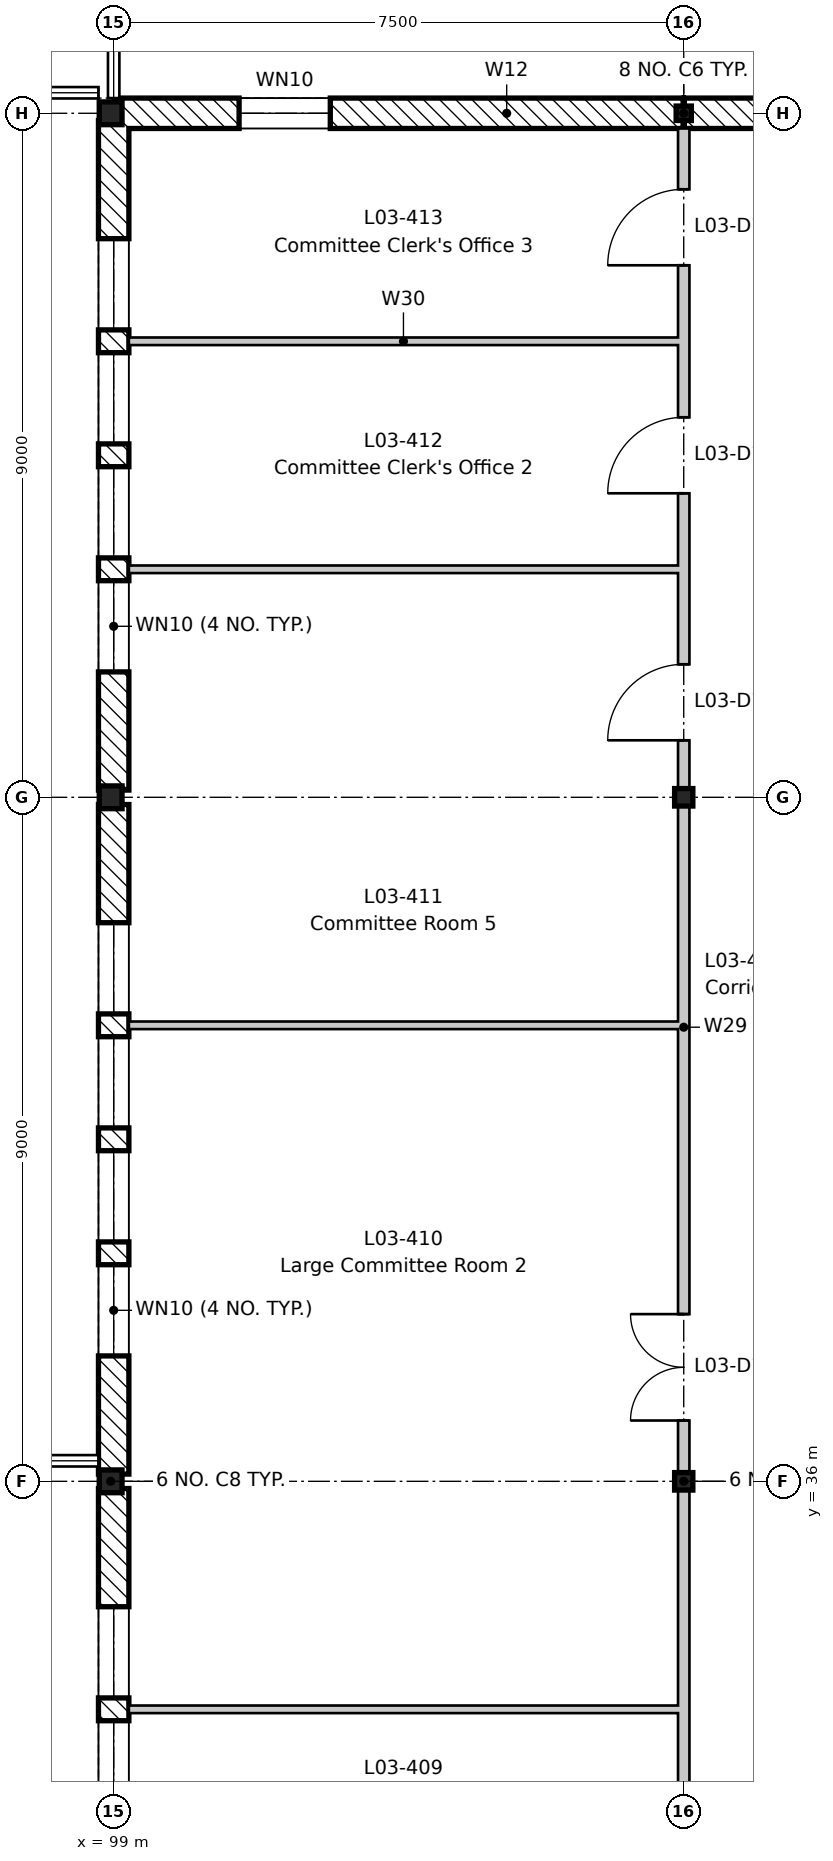
"""IFC4 building model, lengths in metres.
Left out: names, types, materials, properties, quantities, classifications, styles, units other than length and angle.
Written with IfcOpenShell. Run it as: python <this file> out.ifc"""

import sys

from ifc_helpers import new_model, si_unit, direction, frame, frame_2d, origin, origin_2d, place, context, subcontext, project, spatial, rectangle, i_section, extrude, element, fill, save


model = new_model("IFC4")
c1 = context("Model", 3, precision=1e-05, world=origin(), true_north=direction((0.0, 1.0)))
c2 = subcontext(c1, "Body", "Model", "MODEL_VIEW")
j1 = project(units=[si_unit("LENGTHUNIT", "METRE"), si_unit("PLANEANGLEUNIT", "RADIAN")], contexts=[c1])
p1 = place(None, origin())
s1 = spatial("IfcSite", under=j1, at=p1, CompositionType="ELEMENT")
p2 = place(p1, origin())
s2 = spatial("IfcBuilding", under=s1, at=p2, CompositionType="ELEMENT")
p3 = place(p2, frame((0.0, 0.0, 14.4)))
s3 = spatial("IfcBuildingStorey", under=s2, at=p3, CompositionType="ELEMENT", Elevation=14.4)
for number, where, z_axis, x_axis in (
    (1, (99.0, 36.0, -0.2), (0.0, 0.0, 1.0), (1.0, 0.0, 0.0)),
    (2, (99.0, 45.0, -0.2), (0.0, 0.0, 1.0), (1.0, 0.0, 0.0)),
    (3, (99.0, 54.0, -0.2), (0.0, 0.0, 1.0), (1.0, 0.0, 0.0)),
):
    element("IfcColumn", number, at=place(p3, frame(where, z_axis=z_axis, x_axis=x_axis)), inside=s3, PredefinedType="COLUMN", context=c2, shape_type="SweptSolid", body=[
        extrude(i_section(OverallWidth=0.2, OverallDepth=0.19, WebThickness=0.007, FlangeThickness=0.01, FilletRadius=0.018, at=origin_2d()), origin(), (0.0, 0.0, 1.0), 4.15),
    ])
for number, where, z_axis, x_axis in (
    (4, (106.5, 36.0, -0.2), (0.0, 0.0, 1.0), (1.0, 0.0, 0.0)),
    (5, (106.5, 45.0, -0.2), (0.0, 0.0, 1.0), (1.0, 0.0, 0.0)),
):
    element("IfcColumn", number, at=place(p3, frame(where, z_axis=z_axis, x_axis=x_axis)), inside=s3, PredefinedType="COLUMN", context=c2, shape_type="SweptSolid", body=[
        extrude(i_section(OverallWidth=0.24, OverallDepth=0.23, WebThickness=0.008, FlangeThickness=0.012, FilletRadius=0.021, at=origin_2d()), origin(), (0.0, 0.0, 1.0), 4.15),
    ])
p4 = place(p3, frame((106.5, 54.0, -0.2), z_axis=(0.0, 0.0, 1.0), x_axis=(1.0, 0.0, 0.0)))
e6 = element("IfcColumn", 6, at=p4, inside=s3, PredefinedType="COLUMN", context=c2, shape_type="SweptSolid", body=[
    extrude(i_section(OverallWidth=0.2, OverallDepth=0.19, WebThickness=0.007, FlangeThickness=0.01, FilletRadius=0.018, at=origin_2d()), origin(), (0.0, 0.0, 1.0), 4.15),
])
for number, where, z_axis, x_axis in (
    (7, (98.96, 36.0, 3.95), (0.0, 0.0, 1.0), (1.0, 0.0, 0.0)),
    (8, (98.96, 45.0, 3.95), (0.0, 0.0, 1.0), (1.0, 0.0, 0.0)),
    (9, (98.96, 54.0, 3.95), (0.0, 0.0, 1.0), (1.0, 0.0, 0.0)),
):
    element("IfcColumn", number, at=place(p3, frame(where, z_axis=z_axis, x_axis=x_axis)), inside=s3, PredefinedType="COLUMN", context=c2, shape_type="SweptSolid", body=[
        extrude(i_section(OverallWidth=0.3, OverallDepth=0.3, WebThickness=0.011, FlangeThickness=0.019, FilletRadius=0.027, at=origin_2d()), origin(), (0.0, 0.0, 1.0), 0.25),
    ])
p5 = place(p3, frame((99.0, 27.095, 0.0), z_axis=(0.0, 0.0, 1.0), x_axis=(0.0, 1.0, 0.0)))
e10 = element("IfcWall", 10, at=p5, inside=s3, PredefinedType="STANDARD", context=c2, shape_type="SweptSolid", body=[
    extrude(rectangle(XDim=8.81, YDim=0.4, at=frame_2d((4.405, 0.0))), origin(), (0.0, 0.0, 1.0), 3.55),
])
p6 = place(p5, frame((1.555, 0.0, 0.6)))
e11 = element("IfcOpeningElement", 11, at=p6, cuts=e10, PredefinedType="OPENING", context=c2, shape_type="SweptSolid", body=[
    extrude(rectangle(XDim=1.2, YDim=1.8, at=frame_2d((0.6, 0.9))), frame((0.0, 0.21, 0.0), z_axis=(0.0, -1.0, 0.0), x_axis=(1.0, 0.0, 0.0)), (0.0, 0.0, 1.0), 0.42),
])
p7 = place(p5, frame((3.055, 0.0, 0.6)))
e12 = element("IfcOpeningElement", 12, at=p7, cuts=e10, PredefinedType="OPENING", context=c2, shape_type="SweptSolid", body=[
    extrude(rectangle(XDim=1.2, YDim=1.8, at=frame_2d((0.6, 0.9))), frame((0.0, 0.21, 0.0), z_axis=(0.0, -1.0, 0.0), x_axis=(1.0, 0.0, 0.0)), (0.0, 0.0, 1.0), 0.42),
])
p8 = place(p5, frame((4.555, 0.0, 0.6)))
e13 = element("IfcOpeningElement", 13, at=p8, cuts=e10, PredefinedType="OPENING", context=c2, shape_type="SweptSolid", body=[
    extrude(rectangle(XDim=1.2, YDim=1.8, at=frame_2d((0.6, 0.9))), frame((0.0, 0.21, 0.0), z_axis=(0.0, -1.0, 0.0), x_axis=(1.0, 0.0, 0.0)), (0.0, 0.0, 1.0), 0.42),
])
p9 = place(p5, frame((6.055, 0.0, 0.6)))
e14 = element("IfcOpeningElement", 14, at=p9, cuts=e10, PredefinedType="OPENING", context=c2, shape_type="SweptSolid", body=[
    extrude(rectangle(XDim=1.2, YDim=1.8, at=frame_2d((0.6, 0.9))), frame((0.0, 0.21, 0.0), z_axis=(0.0, -1.0, 0.0), x_axis=(1.0, 0.0, 0.0)), (0.0, 0.0, 1.0), 0.42),
])
p10 = place(p3, frame((99.0, 36.095, 0.0), z_axis=(0.0, 0.0, 1.0), x_axis=(0.0, 1.0, 0.0)))
e15 = element("IfcWall", 15, at=p10, inside=s3, PredefinedType="STANDARD", context=c2, shape_type="SweptSolid", body=[
    extrude(rectangle(XDim=8.81, YDim=0.4, at=frame_2d((4.405, 0.0))), origin(), (0.0, 0.0, 1.0), 3.55),
])
p11 = place(p10, frame((1.555, 0.0, 0.6)))
e16 = element("IfcOpeningElement", 16, at=p11, cuts=e15, PredefinedType="OPENING", context=c2, shape_type="SweptSolid", body=[
    extrude(rectangle(XDim=1.2, YDim=1.8, at=frame_2d((0.6, 0.9))), frame((0.0, 0.21, 0.0), z_axis=(0.0, -1.0, 0.0), x_axis=(1.0, 0.0, 0.0)), (0.0, 0.0, 1.0), 0.42),
])
p12 = place(p10, frame((3.055, 0.0, 0.6)))
e17 = element("IfcOpeningElement", 17, at=p12, cuts=e15, PredefinedType="OPENING", context=c2, shape_type="SweptSolid", body=[
    extrude(rectangle(XDim=1.2, YDim=1.8, at=frame_2d((0.6, 0.9))), frame((0.0, 0.21, 0.0), z_axis=(0.0, -1.0, 0.0), x_axis=(1.0, 0.0, 0.0)), (0.0, 0.0, 1.0), 0.42),
])
p13 = place(p10, frame((4.555, 0.0, 0.6)))
e18 = element("IfcOpeningElement", 18, at=p13, cuts=e15, PredefinedType="OPENING", context=c2, shape_type="SweptSolid", body=[
    extrude(rectangle(XDim=1.2, YDim=1.8, at=frame_2d((0.6, 0.9))), frame((0.0, 0.21, 0.0), z_axis=(0.0, -1.0, 0.0), x_axis=(1.0, 0.0, 0.0)), (0.0, 0.0, 1.0), 0.42),
])
p14 = place(p10, frame((6.055, 0.0, 0.6)))
e19 = element("IfcOpeningElement", 19, at=p14, cuts=e15, PredefinedType="OPENING", context=c2, shape_type="SweptSolid", body=[
    extrude(rectangle(XDim=1.2, YDim=1.8, at=frame_2d((0.6, 0.9))), frame((0.0, 0.21, 0.0), z_axis=(0.0, -1.0, 0.0), x_axis=(1.0, 0.0, 0.0)), (0.0, 0.0, 1.0), 0.42),
])
p15 = place(p3, frame((99.0, 45.095, 0.0), z_axis=(0.0, 0.0, 1.0), x_axis=(0.0, 1.0, 0.0)))
e20 = element("IfcWall", 20, at=p15, inside=s3, PredefinedType="STANDARD", context=c2, shape_type="SweptSolid", body=[
    extrude(rectangle(XDim=8.81, YDim=0.4, at=frame_2d((4.405, 0.0))), origin(), (0.0, 0.0, 1.0), 3.55),
])
p16 = place(p15, frame((1.555, 0.0, 0.6)))
e21 = element("IfcOpeningElement", 21, at=p16, cuts=e20, PredefinedType="OPENING", context=c2, shape_type="SweptSolid", body=[
    extrude(rectangle(XDim=1.2, YDim=1.8, at=frame_2d((0.6, 0.9))), frame((0.0, 0.21, 0.0), z_axis=(0.0, -1.0, 0.0), x_axis=(1.0, 0.0, 0.0)), (0.0, 0.0, 1.0), 0.42),
])
p17 = place(p15, frame((3.055, 0.0, 0.6)))
e22 = element("IfcOpeningElement", 22, at=p17, cuts=e20, PredefinedType="OPENING", context=c2, shape_type="SweptSolid", body=[
    extrude(rectangle(XDim=1.2, YDim=1.8, at=frame_2d((0.6, 0.9))), frame((0.0, 0.21, 0.0), z_axis=(0.0, -1.0, 0.0), x_axis=(1.0, 0.0, 0.0)), (0.0, 0.0, 1.0), 0.42),
])
p18 = place(p15, frame((4.555, 0.0, 0.6)))
e23 = element("IfcOpeningElement", 23, at=p18, cuts=e20, PredefinedType="OPENING", context=c2, shape_type="SweptSolid", body=[
    extrude(rectangle(XDim=1.2, YDim=1.8, at=frame_2d((0.6, 0.9))), frame((0.0, 0.21, 0.0), z_axis=(0.0, -1.0, 0.0), x_axis=(1.0, 0.0, 0.0)), (0.0, 0.0, 1.0), 0.42),
])
p19 = place(p15, frame((6.055, 0.0, 0.6)))
e24 = element("IfcOpeningElement", 24, at=p19, cuts=e20, PredefinedType="OPENING", context=c2, shape_type="SweptSolid", body=[
    extrude(rectangle(XDim=1.2, YDim=1.8, at=frame_2d((0.6, 0.9))), frame((0.0, 0.21, 0.0), z_axis=(0.0, -1.0, 0.0), x_axis=(1.0, 0.0, 0.0)), (0.0, 0.0, 1.0), 0.42),
])
p20 = place(p3, frame((99.008, 54.0, 0.0), z_axis=(0.0, 0.0, 1.0), x_axis=(1.0, 0.0, 0.0)))
e25 = element("IfcWall", 25, at=p20, inside=s3, PredefinedType="STANDARD", context=c2, shape_type="SweptSolid", body=[
    extrude(rectangle(XDim=7.483, YDim=0.4, at=frame_2d((3.742, 0.0))), origin(), (0.0, 0.0, 1.0), 3.62),
])
p21 = place(p20, frame((1.642, 0.0, 0.6)))
e26 = element("IfcOpeningElement", 26, at=p21, cuts=e25, PredefinedType="OPENING", context=c2, shape_type="SweptSolid", body=[
    extrude(rectangle(XDim=1.2, YDim=1.8, at=frame_2d((0.6, 0.9))), frame((0.0, 0.21, 0.0), z_axis=(0.0, -1.0, 0.0), x_axis=(1.0, 0.0, 0.0)), (0.0, 0.0, 1.0), 0.42),
])
p22 = place(p3, frame((106.508, 54.0, 0.0), z_axis=(0.0, 0.0, 1.0), x_axis=(1.0, 0.0, 0.0)))
e27 = element("IfcWall", 27, at=p22, inside=s3, PredefinedType="STANDARD", context=c2, shape_type="SweptSolid", body=[
    extrude(rectangle(XDim=2.983, YDim=0.4, at=frame_2d((1.492, 0.0))), origin(), (0.0, 0.0, 1.0), 3.75),
])
for number, where, z_axis, x_axis in (
    (28, (99.2, 33.0, 0.0), (0.0, 0.0, 1.0), (1.0, 0.0, 0.0)),
    (29, (99.2, 42.0, 0.0), (0.0, 0.0, 1.0), (1.0, 0.0, 0.0)),
    (30, (99.2, 48.0, 0.0), (0.0, 0.0, 1.0), (1.0, 0.0, 0.0)),
    (31, (99.2, 51.0, 0.0), (0.0, 0.0, 1.0), (1.0, 0.0, 0.0)),
):
    element("IfcWall", number, at=place(p3, frame(where, z_axis=z_axis, x_axis=x_axis)), inside=s3, PredefinedType="PARTITIONING", context=c2, shape_type="SweptSolid", body=[
        extrude(rectangle(XDim=7.225, YDim=0.1, at=frame_2d((3.613, 0.0))), origin(), (0.0, 0.0, 1.0), 3.95),
    ])
p23 = place(p3, frame((106.5, 0.2, 0.0), z_axis=(0.0, 0.0, 1.0), x_axis=(0.0, 1.0, 0.0)))
e32 = element("IfcWall", 32, at=p23, inside=s3, PredefinedType="PARTITIONING", context=c2, shape_type="SweptSolid", body=[
    extrude(rectangle(XDim=53.6, YDim=0.15, at=frame_2d((26.8, 0.0))), origin(), (0.0, 0.0, 1.0), 3.43),
])
p24 = place(p23, frame((3.6, 0.0, 0.0)))
e33 = element("IfcOpeningElement", 33, at=p24, cuts=e32, PredefinedType="OPENING", context=c2, shape_type="SweptSolid", body=[
    extrude(rectangle(XDim=1.4, YDim=2.1, at=frame_2d((0.7, 1.05))), frame((0.0, 0.085, 0.0), z_axis=(0.0, -1.0, 0.0), x_axis=(1.0, 0.0, 0.0)), (0.0, 0.0, 1.0), 0.17),
])
p25 = place(p23, frame((11.3, 0.0, 0.0)))
e34 = element("IfcOpeningElement", 34, at=p25, cuts=e32, PredefinedType="OPENING", context=c2, shape_type="SweptSolid", body=[
    extrude(rectangle(XDim=1.0, YDim=2.1, at=frame_2d((0.5, 1.05))), frame((0.0, 0.085, 0.0), z_axis=(0.0, -1.0, 0.0), x_axis=(1.0, 0.0, 0.0)), (0.0, 0.0, 1.0), 0.17),
])
p26 = place(p23, frame((15.8, 0.0, 0.0)))
e35 = element("IfcOpeningElement", 35, at=p26, cuts=e32, PredefinedType="OPENING", context=c2, shape_type="SweptSolid", body=[
    extrude(rectangle(XDim=1.0, YDim=2.1, at=frame_2d((0.5, 1.05))), frame((0.0, 0.085, 0.0), z_axis=(0.0, -1.0, 0.0), x_axis=(1.0, 0.0, 0.0)), (0.0, 0.0, 1.0), 0.17),
])
p27 = place(p23, frame((21.6, 0.0, 0.0)))
e36 = element("IfcOpeningElement", 36, at=p27, cuts=e32, PredefinedType="OPENING", context=c2, shape_type="SweptSolid", body=[
    extrude(rectangle(XDim=1.4, YDim=2.1, at=frame_2d((0.7, 1.05))), frame((0.0, 0.085, 0.0), z_axis=(0.0, -1.0, 0.0), x_axis=(1.0, 0.0, 0.0)), (0.0, 0.0, 1.0), 0.17),
])
p28 = place(p23, frame((29.3, 0.0, 0.0)))
e37 = element("IfcOpeningElement", 37, at=p28, cuts=e32, PredefinedType="OPENING", context=c2, shape_type="SweptSolid", body=[
    extrude(rectangle(XDim=1.0, YDim=2.1, at=frame_2d((0.5, 1.05))), frame((0.0, 0.085, 0.0), z_axis=(0.0, -1.0, 0.0), x_axis=(1.0, 0.0, 0.0)), (0.0, 0.0, 1.0), 0.17),
])
p29 = place(p23, frame((36.6, 0.0, 0.0)))
e38 = element("IfcOpeningElement", 38, at=p29, cuts=e32, PredefinedType="OPENING", context=c2, shape_type="SweptSolid", body=[
    extrude(rectangle(XDim=1.4, YDim=2.1, at=frame_2d((0.7, 1.05))), frame((0.0, 0.085, 0.0), z_axis=(0.0, -1.0, 0.0), x_axis=(1.0, 0.0, 0.0)), (0.0, 0.0, 1.0), 0.17),
])
p30 = place(p23, frame((45.55, 0.0, 0.0)))
e39 = element("IfcOpeningElement", 39, at=p30, cuts=e32, PredefinedType="OPENING", context=c2, shape_type="SweptSolid", body=[
    extrude(rectangle(XDim=1.0, YDim=2.1, at=frame_2d((0.5, 1.05))), frame((0.0, 0.085, 0.0), z_axis=(0.0, -1.0, 0.0), x_axis=(1.0, 0.0, 0.0)), (0.0, 0.0, 1.0), 0.17),
])
p31 = place(p23, frame((48.8, 0.0, 0.0)))
e40 = element("IfcOpeningElement", 40, at=p31, cuts=e32, PredefinedType="OPENING", context=c2, shape_type="SweptSolid", body=[
    extrude(rectangle(XDim=1.0, YDim=2.1, at=frame_2d((0.5, 1.05))), frame((0.0, 0.085, 0.0), z_axis=(0.0, -1.0, 0.0), x_axis=(1.0, 0.0, 0.0)), (0.0, 0.0, 1.0), 0.17),
])
p32 = place(p23, frame((51.8, 0.0, 0.0)))
e41 = element("IfcOpeningElement", 41, at=p32, cuts=e32, PredefinedType="OPENING", context=c2, shape_type="SweptSolid", body=[
    extrude(rectangle(XDim=1.0, YDim=2.1, at=frame_2d((0.5, 1.05))), frame((0.0, 0.085, 0.0), z_axis=(0.0, -1.0, 0.0), x_axis=(1.0, 0.0, 0.0)), (0.0, 0.0, 1.0), 0.17),
])
p33 = place(p8, origin())
e42 = element("IfcWindow", 42, at=p33, inside=s3, PartitioningType="SINGLE_PANEL", PredefinedType="WINDOW", context=c2, shape_type="SweptSolid", body=[
    extrude(rectangle(XDim=1.2, YDim=1.8, at=frame_2d((0.6, 0.9))), frame((0.0, 0.03, 0.0), z_axis=(0.0, -1.0, 0.0), x_axis=(1.0, 0.0, 0.0)), (0.0, 0.0, 1.0), 0.06),
])
fill(e13, e42)
p34 = place(p9, origin())
e43 = element("IfcWindow", 43, at=p34, inside=s3, PartitioningType="SINGLE_PANEL", PredefinedType="WINDOW", context=c2, shape_type="SweptSolid", body=[
    extrude(rectangle(XDim=1.2, YDim=1.8, at=frame_2d((0.6, 0.9))), frame((0.0, 0.03, 0.0), z_axis=(0.0, -1.0, 0.0), x_axis=(1.0, 0.0, 0.0)), (0.0, 0.0, 1.0), 0.06),
])
fill(e14, e43)
p35 = place(p11, origin())
e44 = element("IfcWindow", 44, at=p35, inside=s3, PartitioningType="SINGLE_PANEL", PredefinedType="WINDOW", context=c2, shape_type="SweptSolid", body=[
    extrude(rectangle(XDim=1.2, YDim=1.8, at=frame_2d((0.6, 0.9))), frame((0.0, 0.03, 0.0), z_axis=(0.0, -1.0, 0.0), x_axis=(1.0, 0.0, 0.0)), (0.0, 0.0, 1.0), 0.06),
])
fill(e16, e44)
p36 = place(p12, origin())
e45 = element("IfcWindow", 45, at=p36, inside=s3, PartitioningType="SINGLE_PANEL", PredefinedType="WINDOW", context=c2, shape_type="SweptSolid", body=[
    extrude(rectangle(XDim=1.2, YDim=1.8, at=frame_2d((0.6, 0.9))), frame((0.0, 0.03, 0.0), z_axis=(0.0, -1.0, 0.0), x_axis=(1.0, 0.0, 0.0)), (0.0, 0.0, 1.0), 0.06),
])
fill(e17, e45)
p37 = place(p13, origin())
e46 = element("IfcWindow", 46, at=p37, inside=s3, PartitioningType="SINGLE_PANEL", PredefinedType="WINDOW", context=c2, shape_type="SweptSolid", body=[
    extrude(rectangle(XDim=1.2, YDim=1.8, at=frame_2d((0.6, 0.9))), frame((0.0, 0.03, 0.0), z_axis=(0.0, -1.0, 0.0), x_axis=(1.0, 0.0, 0.0)), (0.0, 0.0, 1.0), 0.06),
])
fill(e18, e46)
p38 = place(p14, origin())
e47 = element("IfcWindow", 47, at=p38, inside=s3, PartitioningType="SINGLE_PANEL", PredefinedType="WINDOW", context=c2, shape_type="SweptSolid", body=[
    extrude(rectangle(XDim=1.2, YDim=1.8, at=frame_2d((0.6, 0.9))), frame((0.0, 0.03, 0.0), z_axis=(0.0, -1.0, 0.0), x_axis=(1.0, 0.0, 0.0)), (0.0, 0.0, 1.0), 0.06),
])
fill(e19, e47)
p39 = place(p16, origin())
e48 = element("IfcWindow", 48, at=p39, inside=s3, PartitioningType="SINGLE_PANEL", PredefinedType="WINDOW", context=c2, shape_type="SweptSolid", body=[
    extrude(rectangle(XDim=1.2, YDim=1.8, at=frame_2d((0.6, 0.9))), frame((0.0, 0.03, 0.0), z_axis=(0.0, -1.0, 0.0), x_axis=(1.0, 0.0, 0.0)), (0.0, 0.0, 1.0), 0.06),
])
fill(e21, e48)
p40 = place(p17, origin())
e49 = element("IfcWindow", 49, at=p40, inside=s3, PartitioningType="SINGLE_PANEL", PredefinedType="WINDOW", context=c2, shape_type="SweptSolid", body=[
    extrude(rectangle(XDim=1.2, YDim=1.8, at=frame_2d((0.6, 0.9))), frame((0.0, 0.03, 0.0), z_axis=(0.0, -1.0, 0.0), x_axis=(1.0, 0.0, 0.0)), (0.0, 0.0, 1.0), 0.06),
])
fill(e22, e49)
p41 = place(p18, origin())
e50 = element("IfcWindow", 50, at=p41, inside=s3, PartitioningType="SINGLE_PANEL", PredefinedType="WINDOW", context=c2, shape_type="SweptSolid", body=[
    extrude(rectangle(XDim=1.2, YDim=1.8, at=frame_2d((0.6, 0.9))), frame((0.0, 0.03, 0.0), z_axis=(0.0, -1.0, 0.0), x_axis=(1.0, 0.0, 0.0)), (0.0, 0.0, 1.0), 0.06),
])
fill(e23, e50)
p42 = place(p19, origin())
e51 = element("IfcWindow", 51, at=p42, inside=s3, PartitioningType="SINGLE_PANEL", PredefinedType="WINDOW", context=c2, shape_type="SweptSolid", body=[
    extrude(rectangle(XDim=1.2, YDim=1.8, at=frame_2d((0.6, 0.9))), frame((0.0, 0.03, 0.0), z_axis=(0.0, -1.0, 0.0), x_axis=(1.0, 0.0, 0.0)), (0.0, 0.0, 1.0), 0.06),
])
fill(e24, e51)
p43 = place(p21, origin())
e52 = element("IfcWindow", 52, at=p43, inside=s3, PartitioningType="SINGLE_PANEL", PredefinedType="WINDOW", context=c2, shape_type="SweptSolid", body=[
    extrude(rectangle(XDim=1.2, YDim=1.8, at=frame_2d((0.6, 0.9))), frame((0.0, 0.03, 0.0), z_axis=(0.0, -1.0, 0.0), x_axis=(1.0, 0.0, 0.0)), (0.0, 0.0, 1.0), 0.06),
])
fill(e26, e52)
p44 = place(p29, origin())
e53 = element("IfcDoor", 53, at=p44, inside=s3, OperationType="DOUBLE_DOOR_SINGLE_SWING", PredefinedType="DOOR", context=c2, shape_type="SweptSolid", body=[
    extrude(rectangle(XDim=1.4, YDim=2.1, at=frame_2d((0.7, 1.05))), frame((0.0, 0.025, 0.0), z_axis=(0.0, -1.0, 0.0), x_axis=(1.0, 0.0, 0.0)), (0.0, 0.0, 1.0), 0.05),
])
fill(e38, e53)
p45 = place(p30, origin())
e54 = element("IfcDoor", 54, at=p45, inside=s3, OperationType="SINGLE_SWING_LEFT", PredefinedType="DOOR", context=c2, shape_type="SweptSolid", body=[
    extrude(rectangle(XDim=1.0, YDim=2.1, at=frame_2d((0.5, 1.05))), frame((0.0, 0.025, 0.0), z_axis=(0.0, -1.0, 0.0), x_axis=(1.0, 0.0, 0.0)), (0.0, 0.0, 1.0), 0.05),
])
fill(e39, e54)
p46 = place(p31, origin())
e55 = element("IfcDoor", 55, at=p46, inside=s3, OperationType="SINGLE_SWING_LEFT", PredefinedType="DOOR", context=c2, shape_type="SweptSolid", body=[
    extrude(rectangle(XDim=1.0, YDim=2.1, at=frame_2d((0.5, 1.05))), frame((0.0, 0.025, 0.0), z_axis=(0.0, -1.0, 0.0), x_axis=(1.0, 0.0, 0.0)), (0.0, 0.0, 1.0), 0.05),
])
fill(e40, e55)
p47 = place(p32, origin())
e56 = element("IfcDoor", 56, at=p47, inside=s3, OperationType="SINGLE_SWING_LEFT", PredefinedType="DOOR", context=c2, shape_type="SweptSolid", body=[
    extrude(rectangle(XDim=1.0, YDim=2.1, at=frame_2d((0.5, 1.05))), frame((0.0, 0.025, 0.0), z_axis=(0.0, -1.0, 0.0), x_axis=(1.0, 0.0, 0.0)), (0.0, 0.0, 1.0), 0.05),
])
fill(e41, e56)
save(model, sys.argv[1])
